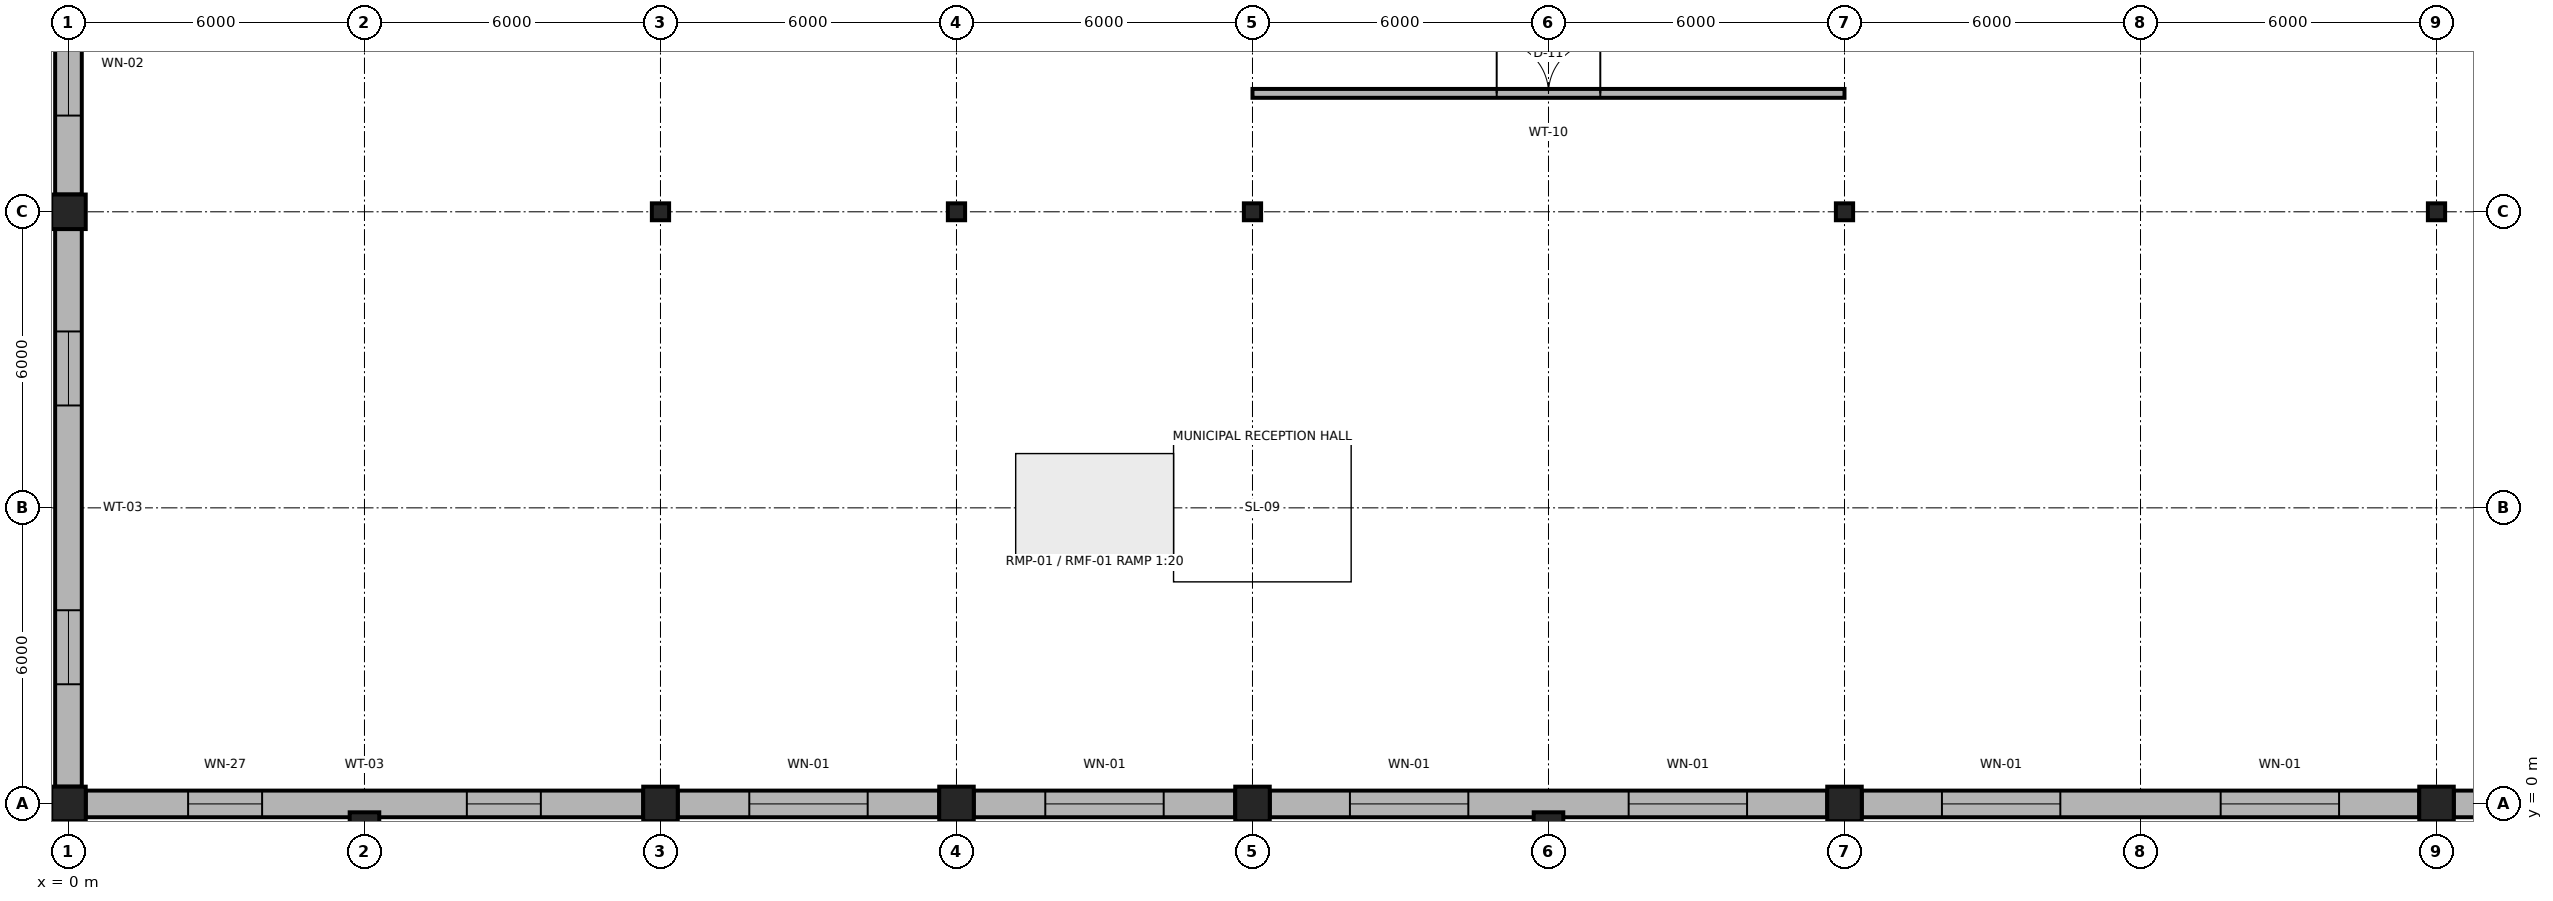
"""IFC4 building model, lengths in metres.
Left out: names, types, materials, properties, quantities, classifications, styles, units other than length and angle.
Written with IfcOpenShell. Run it as: python <this file> out.ifc"""

import sys

from ifc_helpers import new_model, si_unit, direction, frame, frame_2d, origin, origin_2d, place, context, subcontext, project, spatial, rectangle, i_section, extrude, element, fill, save


model = new_model("IFC4")
c1 = context("Model", 3, precision=1e-05, world=origin(), true_north=direction((0.0, 1.0)))
c2 = subcontext(c1, "Body", "Model", "MODEL_VIEW")
j1 = project(units=[si_unit("LENGTHUNIT", "METRE"), si_unit("PLANEANGLEUNIT", "RADIAN")], contexts=[c1])
p1 = place(None, origin())
s1 = spatial("IfcSite", under=j1, at=p1, CompositionType="ELEMENT")
p2 = place(p1, origin())
s2 = spatial("IfcBuilding", under=s1, at=p2, CompositionType="ELEMENT")
p3 = place(p2, origin())
s3 = spatial("IfcBuildingStorey", under=s2, at=p3, CompositionType="ELEMENT", Elevation=0.0)
for number, where, z_axis, x_axis in (
    (1, (0.0, 0.0, 0.0), (0.0, 0.0, 1.0), (1.0, 0.0, 0.0)),
    (2, (12.0, 0.0, 0.0), (0.0, 0.0, 1.0), (1.0, 0.0, 0.0)),
    (3, (18.0, 0.0, 0.0), (0.0, 0.0, 1.0), (1.0, 0.0, 0.0)),
    (4, (24.0, 0.0, 0.0), (0.0, 0.0, 1.0), (1.0, 0.0, 0.0)),
    (5, (36.0, 0.0, 0.0), (0.0, 0.0, 1.0), (1.0, 0.0, 0.0)),
    (6, (48.0, 0.0, 0.0), (0.0, 0.0, 1.0), (1.0, 0.0, 0.0)),
    (7, (0.0, 12.0, 0.0), (0.0, 0.0, 1.0), (1.0, 0.0, 0.0)),
):
    element("IfcColumn", number, at=place(p3, frame(where, z_axis=z_axis, x_axis=x_axis)), inside=s3, PredefinedType="COLUMN", context=c2, shape_type="SweptSolid", body=[
        extrude(rectangle(XDim=0.7, YDim=0.7, at=origin_2d()), origin(), (0.0, 0.0, 1.0), 6.0),
    ])
for number, where, z_axis, x_axis in (
    (8, (12.0, 12.0, 0.0), (0.0, 0.0, 1.0), (1.0, 0.0, 0.0)),
    (9, (18.0, 12.0, 0.0), (0.0, 0.0, 1.0), (1.0, 0.0, 0.0)),
    (10, (24.0, 12.0, 0.0), (0.0, 0.0, 1.0), (1.0, 0.0, 0.0)),
    (11, (36.0, 12.0, 0.0), (0.0, 0.0, 1.0), (1.0, 0.0, 0.0)),
    (12, (48.0, 12.0, 0.0), (0.0, 0.0, 1.0), (1.0, 0.0, 0.0)),
):
    element("IfcColumn", number, at=place(p3, frame(where, z_axis=z_axis, x_axis=x_axis)), inside=s3, PredefinedType="COLUMN", context=c2, shape_type="SweptSolid", body=[
        extrude(i_section(OverallWidth=0.35, OverallDepth=0.343, WebThickness=0.01, FlangeThickness=0.015, FilletRadius=0.02, at=origin_2d()), origin(), (0.0, 0.0, 1.0), 6.0),
    ])
for number, where, z_axis, x_axis in (
    (13, (6.0, -0.35, 0.0), (0.0, 0.0, 1.0), (1.0, 0.0, 0.0)),
    (14, (30.0, -0.35, 0.0), (0.0, 0.0, 1.0), (1.0, 0.0, 0.0)),
):
    element("IfcColumn", number, at=place(p3, frame(where, z_axis=z_axis, x_axis=x_axis)), inside=s3, PredefinedType="PILASTER", context=c2, shape_type="SweptSolid", body=[
        extrude(rectangle(XDim=0.6, YDim=0.36, at=origin_2d()), origin(), (0.0, 0.0, 1.0), 6.0),
    ])
p4 = place(p3, frame((0.35, 0.0, 0.0), z_axis=(0.0, 0.0, 1.0), x_axis=(1.0, 0.0, 0.0)))
e15 = element("IfcWall", 15, at=p4, inside=s3, PredefinedType="SOLIDWALL", context=c2, shape_type="SweptSolid", body=[
    extrude(rectangle(XDim=11.3, YDim=0.54, at=frame_2d((5.65, 0.0))), origin(), (0.0, 0.0, 1.0), 5.31),
])
p5 = place(p4, frame((2.075, 0.0, 0.85)))
e16 = element("IfcOpeningElement", 16, at=p5, cuts=e15, PredefinedType="OPENING", context=c2, shape_type="SweptSolid", body=[
    extrude(rectangle(XDim=1.5, YDim=2.8, at=frame_2d((0.75, 1.4))), frame((0.0, 0.285, 0.0), z_axis=(0.0, -1.0, 0.0), x_axis=(1.0, 0.0, 0.0)), (0.0, 0.0, 1.0), 0.57),
])
p6 = place(p4, frame((7.725, 0.0, 0.85)))
e17 = element("IfcOpeningElement", 17, at=p6, cuts=e15, PredefinedType="OPENING", context=c2, shape_type="SweptSolid", body=[
    extrude(rectangle(XDim=1.5, YDim=2.8, at=frame_2d((0.75, 1.4))), frame((0.0, 0.285, 0.0), z_axis=(0.0, -1.0, 0.0), x_axis=(1.0, 0.0, 0.0)), (0.0, 0.0, 1.0), 0.57),
])
p7 = place(p3, frame((12.35, 0.0, 0.0), z_axis=(0.0, 0.0, 1.0), x_axis=(1.0, 0.0, 0.0)))
e18 = element("IfcWall", 18, at=p7, inside=s3, PredefinedType="SOLIDWALL", context=c2, shape_type="SweptSolid", body=[
    extrude(rectangle(XDim=5.3, YDim=0.54, at=frame_2d((2.65, 0.0))), origin(), (0.0, 0.0, 1.0), 5.31),
])
p8 = place(p7, frame((1.45, 0.0, 0.85)))
e19 = element("IfcOpeningElement", 19, at=p8, cuts=e18, PredefinedType="OPENING", context=c2, shape_type="SweptSolid", body=[
    extrude(rectangle(XDim=2.4, YDim=3.6, at=frame_2d((1.2, 1.8))), frame((0.0, 0.285, 0.0), z_axis=(0.0, -1.0, 0.0), x_axis=(1.0, 0.0, 0.0)), (0.0, 0.0, 1.0), 0.57),
])
p9 = place(p3, frame((18.35, 0.0, 0.0), z_axis=(0.0, 0.0, 1.0), x_axis=(1.0, 0.0, 0.0)))
e20 = element("IfcWall", 20, at=p9, inside=s3, PredefinedType="SOLIDWALL", context=c2, shape_type="SweptSolid", body=[
    extrude(rectangle(XDim=5.3, YDim=0.54, at=frame_2d((2.65, 0.0))), origin(), (0.0, 0.0, 1.0), 5.31),
])
p10 = place(p9, frame((1.45, 0.0, 0.85)))
e21 = element("IfcOpeningElement", 21, at=p10, cuts=e20, PredefinedType="OPENING", context=c2, shape_type="SweptSolid", body=[
    extrude(rectangle(XDim=2.4, YDim=3.6, at=frame_2d((1.2, 1.8))), frame((0.0, 0.285, 0.0), z_axis=(0.0, -1.0, 0.0), x_axis=(1.0, 0.0, 0.0)), (0.0, 0.0, 1.0), 0.57),
])
p11 = place(p3, frame((24.35, 0.0, 0.0), z_axis=(0.0, 0.0, 1.0), x_axis=(1.0, 0.0, 0.0)))
e22 = element("IfcWall", 22, at=p11, inside=s3, PredefinedType="SOLIDWALL", context=c2, shape_type="SweptSolid", body=[
    extrude(rectangle(XDim=11.3, YDim=0.54, at=frame_2d((5.65, 0.0))), origin(), (0.0, 0.0, 1.0), 5.31),
])
p12 = place(p11, frame((1.625, 0.0, 0.85)))
e23 = element("IfcOpeningElement", 23, at=p12, cuts=e22, PredefinedType="OPENING", context=c2, shape_type="SweptSolid", body=[
    extrude(rectangle(XDim=2.4, YDim=3.6, at=frame_2d((1.2, 1.8))), frame((0.0, 0.285, 0.0), z_axis=(0.0, -1.0, 0.0), x_axis=(1.0, 0.0, 0.0)), (0.0, 0.0, 1.0), 0.57),
])
p13 = place(p11, frame((7.275, 0.0, 0.85)))
e24 = element("IfcOpeningElement", 24, at=p13, cuts=e22, PredefinedType="OPENING", context=c2, shape_type="SweptSolid", body=[
    extrude(rectangle(XDim=2.4, YDim=3.6, at=frame_2d((1.2, 1.8))), frame((0.0, 0.285, 0.0), z_axis=(0.0, -1.0, 0.0), x_axis=(1.0, 0.0, 0.0)), (0.0, 0.0, 1.0), 0.57),
])
p14 = place(p3, frame((36.35, 0.0, 0.0), z_axis=(0.0, 0.0, 1.0), x_axis=(1.0, 0.0, 0.0)))
e25 = element("IfcWall", 25, at=p14, inside=s3, PredefinedType="SOLIDWALL", context=c2, shape_type="SweptSolid", body=[
    extrude(rectangle(XDim=11.3, YDim=0.54, at=frame_2d((5.65, 0.0))), origin(), (0.0, 0.0, 1.0), 5.31),
])
p15 = place(p14, frame((1.625, 0.0, 0.85)))
e26 = element("IfcOpeningElement", 26, at=p15, cuts=e25, PredefinedType="OPENING", context=c2, shape_type="SweptSolid", body=[
    extrude(rectangle(XDim=2.4, YDim=3.6, at=frame_2d((1.2, 1.8))), frame((0.0, 0.285, 0.0), z_axis=(0.0, -1.0, 0.0), x_axis=(1.0, 0.0, 0.0)), (0.0, 0.0, 1.0), 0.57),
])
p16 = place(p14, frame((7.275, 0.0, 0.85)))
e27 = element("IfcOpeningElement", 27, at=p16, cuts=e25, PredefinedType="OPENING", context=c2, shape_type="SweptSolid", body=[
    extrude(rectangle(XDim=2.4, YDim=3.6, at=frame_2d((1.2, 1.8))), frame((0.0, 0.285, 0.0), z_axis=(0.0, -1.0, 0.0), x_axis=(1.0, 0.0, 0.0)), (0.0, 0.0, 1.0), 0.57),
])
p17 = place(p3, frame((48.35, 0.0, 0.0), z_axis=(0.0, 0.0, 1.0), x_axis=(1.0, 0.0, 0.0)))
e28 = element("IfcWall", 28, at=p17, inside=s3, PredefinedType="SOLIDWALL", context=c2, shape_type="SweptSolid", body=[
    extrude(rectangle(XDim=5.3, YDim=0.54, at=frame_2d((2.65, 0.0))), origin(), (0.0, 0.0, 1.0), 5.31),
])
p18 = place(p17, frame((1.45, 0.0, 0.85)))
e29 = element("IfcOpeningElement", 29, at=p18, cuts=e28, PredefinedType="OPENING", context=c2, shape_type="SweptSolid", body=[
    extrude(rectangle(XDim=2.4, YDim=3.6, at=frame_2d((1.2, 1.8))), frame((0.0, 0.285, 0.0), z_axis=(0.0, -1.0, 0.0), x_axis=(1.0, 0.0, 0.0)), (0.0, 0.0, 1.0), 0.57),
])
p19 = place(p3, frame((0.0, 0.35, 0.0), z_axis=(0.0, 0.0, 1.0), x_axis=(0.0, 1.0, 0.0)))
e30 = element("IfcWall", 30, at=p19, inside=s3, PredefinedType="SOLIDWALL", context=c2, shape_type="SweptSolid", body=[
    extrude(rectangle(XDim=11.3, YDim=0.54, at=frame_2d((5.65, 0.0))), origin(), (0.0, 0.0, 1.0), 5.31),
])
p20 = place(p19, frame((2.075, 0.0, 0.85)))
e31 = element("IfcOpeningElement", 31, at=p20, cuts=e30, PredefinedType="OPENING", context=c2, shape_type="SweptSolid", body=[
    extrude(rectangle(XDim=1.5, YDim=2.8, at=frame_2d((0.75, 1.4))), frame((0.0, 0.285, 0.0), z_axis=(0.0, -1.0, 0.0), x_axis=(1.0, 0.0, 0.0)), (0.0, 0.0, 1.0), 0.57),
])
p21 = place(p19, frame((7.725, 0.0, 0.85)))
e32 = element("IfcOpeningElement", 32, at=p21, cuts=e30, PredefinedType="OPENING", context=c2, shape_type="SweptSolid", body=[
    extrude(rectangle(XDim=1.5, YDim=2.8, at=frame_2d((0.75, 1.4))), frame((0.0, 0.285, 0.0), z_axis=(0.0, -1.0, 0.0), x_axis=(1.0, 0.0, 0.0)), (0.0, 0.0, 1.0), 0.57),
])
p22 = place(p3, frame((0.0, 12.35, 0.0), z_axis=(0.0, 0.0, 1.0), x_axis=(0.0, 1.0, 0.0)))
e33 = element("IfcWall", 33, at=p22, inside=s3, PredefinedType="SOLIDWALL", context=c2, shape_type="SweptSolid", body=[
    extrude(rectangle(XDim=5.3, YDim=0.54, at=frame_2d((2.65, 0.0))), origin(), (0.0, 0.0, 1.0), 5.31),
])
p23 = place(p22, frame((1.6, 0.0, 0.85)))
e34 = element("IfcOpeningElement", 34, at=p23, cuts=e33, PredefinedType="OPENING", context=c2, shape_type="SweptSolid", body=[
    extrude(rectangle(XDim=2.1, YDim=3.4, at=frame_2d((1.05, 1.7))), frame((0.0, 0.285, 0.0), z_axis=(0.0, -1.0, 0.0), x_axis=(1.0, 0.0, 0.0)), (0.0, 0.0, 1.0), 0.57),
])
p24 = place(p3, frame((24.0, 14.4, 0.0), z_axis=(0.0, 0.0, 1.0), x_axis=(1.0, 0.0, 0.0)))
e35 = element("IfcWall", 35, at=p24, inside=s3, PredefinedType="PARTITIONING", context=c2, shape_type="SweptSolid", body=[
    extrude(rectangle(XDim=12.0, YDim=0.18, at=frame_2d((6.0, 0.0))), origin(), (0.0, 0.0, 1.0), 5.76),
])
p25 = place(p24, frame((4.95, 0.0, 0.0)))
e36 = element("IfcOpeningElement", 36, at=p25, cuts=e35, PredefinedType="OPENING", context=c2, shape_type="SweptSolid", body=[
    extrude(rectangle(XDim=2.1, YDim=2.9, at=frame_2d((1.05, 1.45))), frame((0.0, 0.105, 0.0), z_axis=(0.0, -1.0, 0.0), x_axis=(1.0, 0.0, 0.0)), (0.0, 0.0, 1.0), 0.21),
])
p26 = place(p5, origin())
e37 = element("IfcWindow", 37, at=p26, inside=s3, PartitioningType="SINGLE_PANEL", PredefinedType="WINDOW", context=c2, shape_type="SweptSolid", body=[
    extrude(rectangle(XDim=1.5, YDim=2.8, at=frame_2d((0.75, 1.4))), frame((0.0, 0.03, 0.0), z_axis=(0.0, -1.0, 0.0), x_axis=(1.0, 0.0, 0.0)), (0.0, 0.0, 1.0), 0.06),
])
fill(e16, e37)
p27 = place(p6, origin())
e38 = element("IfcWindow", 38, at=p27, inside=s3, PartitioningType="SINGLE_PANEL", PredefinedType="WINDOW", context=c2, shape_type="SweptSolid", body=[
    extrude(rectangle(XDim=1.5, YDim=2.8, at=frame_2d((0.75, 1.4))), frame((0.0, 0.03, 0.0), z_axis=(0.0, -1.0, 0.0), x_axis=(1.0, 0.0, 0.0)), (0.0, 0.0, 1.0), 0.06),
])
fill(e17, e38)
p28 = place(p8, origin())
e39 = element("IfcWindow", 39, at=p28, inside=s3, PartitioningType="SINGLE_PANEL", PredefinedType="WINDOW", context=c2, shape_type="SweptSolid", body=[
    extrude(rectangle(XDim=2.4, YDim=3.6, at=frame_2d((1.2, 1.8))), frame((0.0, 0.03, 0.0), z_axis=(0.0, -1.0, 0.0), x_axis=(1.0, 0.0, 0.0)), (0.0, 0.0, 1.0), 0.06),
])
fill(e19, e39)
p29 = place(p10, origin())
e40 = element("IfcWindow", 40, at=p29, inside=s3, PartitioningType="SINGLE_PANEL", PredefinedType="WINDOW", context=c2, shape_type="SweptSolid", body=[
    extrude(rectangle(XDim=2.4, YDim=3.6, at=frame_2d((1.2, 1.8))), frame((0.0, 0.03, 0.0), z_axis=(0.0, -1.0, 0.0), x_axis=(1.0, 0.0, 0.0)), (0.0, 0.0, 1.0), 0.06),
])
fill(e21, e40)
p30 = place(p12, origin())
e41 = element("IfcWindow", 41, at=p30, inside=s3, PartitioningType="SINGLE_PANEL", PredefinedType="WINDOW", context=c2, shape_type="SweptSolid", body=[
    extrude(rectangle(XDim=2.4, YDim=3.6, at=frame_2d((1.2, 1.8))), frame((0.0, 0.03, 0.0), z_axis=(0.0, -1.0, 0.0), x_axis=(1.0, 0.0, 0.0)), (0.0, 0.0, 1.0), 0.06),
])
fill(e23, e41)
p31 = place(p13, origin())
e42 = element("IfcWindow", 42, at=p31, inside=s3, PartitioningType="SINGLE_PANEL", PredefinedType="WINDOW", context=c2, shape_type="SweptSolid", body=[
    extrude(rectangle(XDim=2.4, YDim=3.6, at=frame_2d((1.2, 1.8))), frame((0.0, 0.03, 0.0), z_axis=(0.0, -1.0, 0.0), x_axis=(1.0, 0.0, 0.0)), (0.0, 0.0, 1.0), 0.06),
])
fill(e24, e42)
p32 = place(p15, origin())
e43 = element("IfcWindow", 43, at=p32, inside=s3, PartitioningType="SINGLE_PANEL", PredefinedType="WINDOW", context=c2, shape_type="SweptSolid", body=[
    extrude(rectangle(XDim=2.4, YDim=3.6, at=frame_2d((1.2, 1.8))), frame((0.0, 0.03, 0.0), z_axis=(0.0, -1.0, 0.0), x_axis=(1.0, 0.0, 0.0)), (0.0, 0.0, 1.0), 0.06),
])
fill(e26, e43)
p33 = place(p16, origin())
e44 = element("IfcWindow", 44, at=p33, inside=s3, PartitioningType="SINGLE_PANEL", PredefinedType="WINDOW", context=c2, shape_type="SweptSolid", body=[
    extrude(rectangle(XDim=2.4, YDim=3.6, at=frame_2d((1.2, 1.8))), frame((0.0, 0.03, 0.0), z_axis=(0.0, -1.0, 0.0), x_axis=(1.0, 0.0, 0.0)), (0.0, 0.0, 1.0), 0.06),
])
fill(e27, e44)
p34 = place(p20, origin())
e45 = element("IfcWindow", 45, at=p34, inside=s3, PartitioningType="SINGLE_PANEL", PredefinedType="WINDOW", context=c2, shape_type="SweptSolid", body=[
    extrude(rectangle(XDim=1.5, YDim=2.8, at=frame_2d((0.75, 1.4))), frame((0.0, 0.03, 0.0), z_axis=(0.0, -1.0, 0.0), x_axis=(1.0, 0.0, 0.0)), (0.0, 0.0, 1.0), 0.06),
])
fill(e31, e45)
p35 = place(p21, origin())
e46 = element("IfcWindow", 46, at=p35, inside=s3, PartitioningType="SINGLE_PANEL", PredefinedType="WINDOW", context=c2, shape_type="SweptSolid", body=[
    extrude(rectangle(XDim=1.5, YDim=2.8, at=frame_2d((0.75, 1.4))), frame((0.0, 0.03, 0.0), z_axis=(0.0, -1.0, 0.0), x_axis=(1.0, 0.0, 0.0)), (0.0, 0.0, 1.0), 0.06),
])
fill(e32, e46)
p36 = place(p23, origin())
e47 = element("IfcWindow", 47, at=p36, inside=s3, PartitioningType="SINGLE_PANEL", PredefinedType="WINDOW", context=c2, shape_type="SweptSolid", body=[
    extrude(rectangle(XDim=2.1, YDim=3.4, at=frame_2d((1.05, 1.7))), frame((0.0, 0.03, 0.0), z_axis=(0.0, -1.0, 0.0), x_axis=(1.0, 0.0, 0.0)), (0.0, 0.0, 1.0), 0.06),
])
fill(e34, e47)
p37 = place(p25, origin())
e48 = element("IfcDoor", 48, at=p37, inside=s3, OperationType="DOUBLE_DOOR_SINGLE_SWING", PredefinedType="DOOR", context=c2, shape_type="SweptSolid", body=[
    extrude(rectangle(XDim=2.1, YDim=2.9, at=frame_2d((1.05, 1.45))), frame((0.0, 0.025, 0.0), z_axis=(0.0, -1.0, 0.0), x_axis=(1.0, 0.0, 0.0)), (0.0, 0.0, 1.0), 0.05),
])
fill(e36, e48)
save(model, sys.argv[1])
